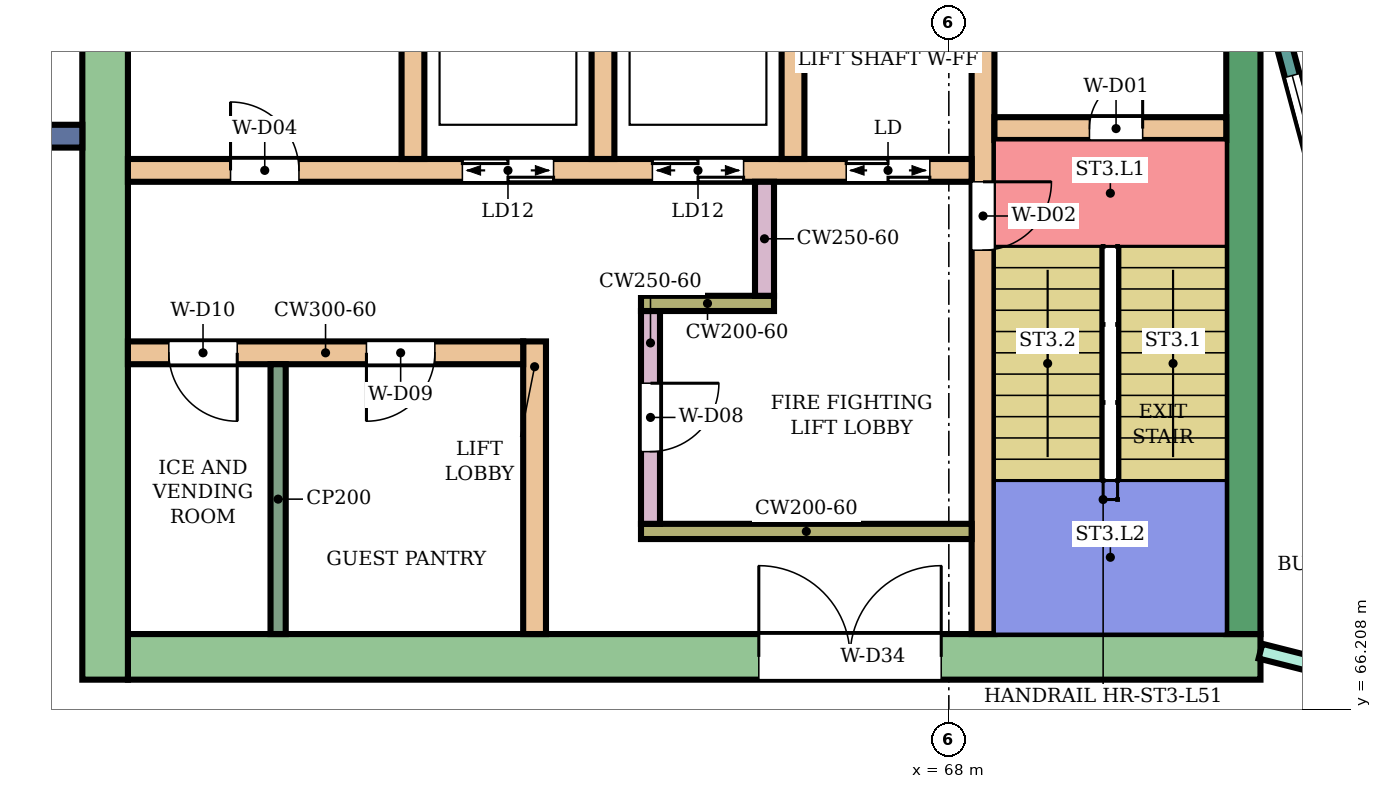
"""IFC4 building model, lengths in metres.
Left out: names, types, materials, properties, quantities, classifications, styles, units other than length and angle.
Written with IfcOpenShell. Run it as: python <this file> out.ifc"""

import sys

from ifc_helpers import new_model, si_unit, direction, frame, frame_2d, origin, place, context, subcontext, project, spatial, rectangle, extrude, element, fill, save


model = new_model("IFC4")
c1 = context("Model", 3, precision=1e-05, world=origin(), true_north=direction((0.0, 1.0)))
c2 = subcontext(c1, "Body", "Model", "MODEL_VIEW")
j1 = project(units=[si_unit("LENGTHUNIT", "METRE"), si_unit("PLANEANGLEUNIT", "RADIAN")], contexts=[c1])
p1 = place(None, origin())
s1 = spatial("IfcSite", under=j1, at=p1, CompositionType="ELEMENT")
p2 = place(p1, origin())
s2 = spatial("IfcBuilding", under=s1, at=p2, CompositionType="ELEMENT")
p3 = place(p2, frame((0.0, 0.0, 220.9)))
s3 = spatial("IfcBuildingStorey", under=s2, at=p3, CompositionType="ELEMENT", Elevation=220.9)
p4 = place(p3, frame((72.1, 66.9, 0.0), z_axis=(0.0, 0.0, 1.0), x_axis=(-1.0, 0.0, 0.0)))
e1 = element("IfcWall", 1, at=p4, inside=s3, PredefinedType="SHEAR", context=c2, shape_type="SweptSolid", body=[
    extrude(rectangle(XDim=14.9, YDim=0.6, at=frame_2d((7.45, 0.0))), origin(), (0.0, 0.0, 1.0), 3.88),
])
p5 = place(p4, frame((4.2, 0.0, 0.0)))
e2 = element("IfcOpeningElement", 2, at=p5, cuts=e1, PredefinedType="OPENING", context=c2, shape_type="SweptSolid", body=[
    extrude(rectangle(XDim=2.4, YDim=2.4, at=frame_2d((1.2, 1.2))), frame((0.0, 0.31, 0.0), z_axis=(0.0, -1.0, 0.0), x_axis=(1.0, 0.0, 0.0)), (0.0, 0.0, 1.0), 0.62),
])
p6 = place(p3, frame((71.875, 75.0, 0.0), z_axis=(0.0, 0.0, 1.0), x_axis=(0.0, -1.0, 0.0)))
e3 = element("IfcWall", 3, at=p6, inside=s3, PredefinedType="SHEAR", context=c2, shape_type="SweptSolid", body=[
    extrude(rectangle(XDim=7.8, YDim=0.45, at=frame_2d((3.9, 0.0))), origin(), (0.0, 0.0, 1.0), 3.88),
])
p7 = place(p3, frame((56.9, 83.4, 0.0), z_axis=(0.0, 0.0, 1.0), x_axis=(0.0, -1.0, 0.0)))
e4 = element("IfcWall", 4, at=p7, inside=s3, PredefinedType="SHEAR", context=c2, shape_type="SweptSolid", body=[
    extrude(rectangle(XDim=16.8, YDim=0.6, at=frame_2d((8.4, 0.0))), origin(), (0.0, 0.0, 1.0), 3.88),
])
p8 = place(p3, frame((68.45, 75.0, 0.0), z_axis=(0.0, 0.0, 1.0), x_axis=(0.0, -1.0, 0.0)))
e5 = element("IfcWall", 5, at=p8, inside=s3, PredefinedType="SHEAR", context=c2, shape_type="SweptSolid", body=[
    extrude(rectangle(XDim=7.8, YDim=0.3, at=frame_2d((3.9, 0.0))), origin(), (0.0, 0.0, 1.0), 3.88),
])
p9 = place(p8, frame((1.85, 0.0, 0.0)))
e6 = element("IfcOpeningElement", 6, at=p9, cuts=e5, PredefinedType="OPENING", context=c2, shape_type="SweptSolid", body=[
    extrude(rectangle(XDim=0.9, YDim=2.1, at=frame_2d((0.45, 1.05))), frame((0.0, 0.16, 0.0), z_axis=(0.0, -1.0, 0.0), x_axis=(1.0, 0.0, 0.0)), (0.0, 0.0, 1.0), 0.32),
])
p10 = place(p3, frame((71.65, 73.85, 0.0), z_axis=(0.0, 0.0, 1.0), x_axis=(-1.0, 0.0, 0.0)))
e7 = element("IfcWall", 7, at=p10, inside=s3, PredefinedType="SHEAR", context=c2, shape_type="SweptSolid", body=[
    extrude(rectangle(XDim=3.05, YDim=0.3, at=frame_2d((1.525, 0.0))), origin(), (0.0, 0.0, 1.0), 3.88),
])
p11 = place(p10, frame((1.1, 0.0, 0.0)))
e8 = element("IfcOpeningElement", 8, at=p11, cuts=e7, PredefinedType="OPENING", context=c2, shape_type="SweptSolid", body=[
    extrude(rectangle(XDim=0.7, YDim=2.0, at=frame_2d((0.35, 1.0))), frame((0.0, 0.16, 0.0), z_axis=(0.0, -1.0, 0.0), x_axis=(1.0, 0.0, 0.0)), (0.0, 0.0, 1.0), 0.32),
])
p12 = place(p3, frame((68.3, 73.3, 0.0), z_axis=(0.0, 0.0, 1.0), x_axis=(-1.0, 0.0, 0.0)))
e9 = element("IfcWall", 9, at=p12, inside=s3, PredefinedType="SHEAR", context=c2, shape_type="SweptSolid", body=[
    extrude(rectangle(XDim=11.1, YDim=0.3, at=frame_2d((5.55, 0.0))), origin(), (0.0, 0.0, 1.0), 3.88),
])
p13 = place(p12, frame((0.55, 0.0, 0.0)))
e10 = element("IfcOpeningElement", 10, at=p13, cuts=e9, PredefinedType="OPENING", context=c2, shape_type="SweptSolid", body=[
    extrude(rectangle(XDim=1.1, YDim=2.1, at=frame_2d((0.55, 1.05))), frame((0.0, 0.16, 0.0), z_axis=(0.0, -1.0, 0.0), x_axis=(1.0, 0.0, 0.0)), (0.0, 0.0, 1.0), 0.32),
])
p14 = place(p12, frame((3.0, 0.0, 0.0)))
e11 = element("IfcOpeningElement", 11, at=p14, cuts=e9, PredefinedType="OPENING", context=c2, shape_type="SweptSolid", body=[
    extrude(rectangle(XDim=1.2, YDim=2.1, at=frame_2d((0.6, 1.05))), frame((0.0, 0.16, 0.0), z_axis=(0.0, -1.0, 0.0), x_axis=(1.0, 0.0, 0.0)), (0.0, 0.0, 1.0), 0.32),
])
p15 = place(p12, frame((5.5, 0.0, 0.0)))
e12 = element("IfcOpeningElement", 12, at=p15, cuts=e9, PredefinedType="OPENING", context=c2, shape_type="SweptSolid", body=[
    extrude(rectangle(XDim=1.2, YDim=2.1, at=frame_2d((0.6, 1.05))), frame((0.0, 0.16, 0.0), z_axis=(0.0, -1.0, 0.0), x_axis=(1.0, 0.0, 0.0)), (0.0, 0.0, 1.0), 0.32),
])
p16 = place(p12, frame((8.85, 0.0, 0.0)))
e13 = element("IfcOpeningElement", 13, at=p16, cuts=e9, PredefinedType="OPENING", context=c2, shape_type="SweptSolid", body=[
    extrude(rectangle(XDim=0.9, YDim=2.1, at=frame_2d((0.45, 1.05))), frame((0.0, 0.16, 0.0), z_axis=(0.0, -1.0, 0.0), x_axis=(1.0, 0.0, 0.0)), (0.0, 0.0, 1.0), 0.32),
])
for number, where, z_axis, x_axis in (
    (14, (65.95, 76.0, 0.0), (0.0, 0.0, 1.0), (0.0, -1.0, 0.0)),
    (15, (63.45, 76.0, 0.0), (0.0, 0.0, 1.0), (0.0, -1.0, 0.0)),
    (16, (60.95, 76.0, 0.0), (0.0, 0.0, 1.0), (0.0, -1.0, 0.0)),
):
    element("IfcWall", number, at=place(p3, frame(where, z_axis=z_axis, x_axis=x_axis)), inside=s3, PredefinedType="SHEAR", context=c2, shape_type="SweptSolid", body=[
        extrude(rectangle(XDim=2.55, YDim=0.3, at=frame_2d((1.275, 0.0))), origin(), (0.0, 0.0, 1.0), 3.88),
    ])
p17 = place(p3, frame((68.3, 68.55, 0.0), z_axis=(0.0, 0.0, 1.0), x_axis=(-1.0, 0.0, 0.0)))
e17 = element("IfcWall", 17, at=p17, inside=s3, PredefinedType="SHEAR", context=c2, shape_type="SweptSolid", body=[
    extrude(rectangle(XDim=4.35, YDim=0.2, at=frame_2d((2.175, 0.0))), origin(), (0.0, 0.0, 1.0), 3.88),
])
p18 = place(p3, frame((64.075, 71.45, 0.0), z_axis=(0.0, 0.0, 1.0), x_axis=(0.0, -1.0, 0.0)))
e18 = element("IfcWall", 18, at=p18, inside=s3, PredefinedType="SHEAR", context=c2, shape_type="SweptSolid", body=[
    extrude(rectangle(XDim=2.8, YDim=0.25, at=frame_2d((1.4, 0.0))), origin(), (0.0, 0.0, 1.0), 3.88),
])
p19 = place(p18, frame((0.95, 0.0, 0.0)))
e19 = element("IfcOpeningElement", 19, at=p19, cuts=e18, PredefinedType="OPENING", context=c2, shape_type="SweptSolid", body=[
    extrude(rectangle(XDim=0.9, YDim=2.1, at=frame_2d((0.45, 1.05))), frame((0.0, 0.135, 0.0), z_axis=(0.0, -1.0, 0.0), x_axis=(1.0, 0.0, 0.0)), (0.0, 0.0, 1.0), 0.27),
])
p20 = place(p3, frame((65.7, 71.55, 0.0), z_axis=(0.0, 0.0, 1.0), x_axis=(-1.0, 0.0, 0.0)))
e20 = element("IfcWall", 20, at=p20, inside=s3, PredefinedType="SHEAR", context=c2, shape_type="SweptSolid", body=[
    extrude(rectangle(XDim=1.75, YDim=0.2, at=frame_2d((0.875, 0.0))), origin(), (0.0, 0.0, 1.0), 3.88),
])
p21 = place(p3, frame((65.575, 73.15, 0.0), z_axis=(0.0, 0.0, 1.0), x_axis=(0.0, -1.0, 0.0)))
e21 = element("IfcWall", 21, at=p21, inside=s3, PredefinedType="SHEAR", context=c2, shape_type="SweptSolid", body=[
    extrude(rectangle(XDim=1.5, YDim=0.25, at=frame_2d((0.75, 0.0))), origin(), (0.0, 0.0, 1.0), 3.88),
])
p22 = place(p3, frame((62.55, 71.05, 0.0), z_axis=(0.0, 0.0, 1.0), x_axis=(0.0, -1.0, 0.0)))
e22 = element("IfcWall", 22, at=p22, inside=s3, PredefinedType="SHEAR", context=c2, shape_type="SweptSolid", body=[
    extrude(rectangle(XDim=3.85, YDim=0.3, at=frame_2d((1.925, 0.0))), origin(), (0.0, 0.0, 1.0), 3.88),
])
p23 = place(p3, frame((62.4, 70.9, 0.0), z_axis=(0.0, 0.0, 1.0), x_axis=(-1.0, 0.0, 0.0)))
e23 = element("IfcWall", 23, at=p23, inside=s3, PredefinedType="SHEAR", context=c2, shape_type="SweptSolid", body=[
    extrude(rectangle(XDim=5.2, YDim=0.3, at=frame_2d((2.6, 0.0))), origin(), (0.0, 0.0, 1.0), 3.88),
])
p24 = place(p23, frame((1.162, 0.0, 0.0)))
e24 = element("IfcOpeningElement", 24, at=p24, cuts=e23, PredefinedType="OPENING", context=c2, shape_type="SweptSolid", body=[
    extrude(rectangle(XDim=0.9, YDim=2.1, at=frame_2d((0.45, 1.05))), frame((0.0, 0.16, 0.0), z_axis=(0.0, -1.0, 0.0), x_axis=(1.0, 0.0, 0.0)), (0.0, 0.0, 1.0), 0.32),
])
p25 = place(p23, frame((3.762, 0.0, 0.0)))
e25 = element("IfcOpeningElement", 25, at=p25, cuts=e23, PredefinedType="OPENING", context=c2, shape_type="SweptSolid", body=[
    extrude(rectangle(XDim=0.9, YDim=2.1, at=frame_2d((0.45, 1.05))), frame((0.0, 0.16, 0.0), z_axis=(0.0, -1.0, 0.0), x_axis=(1.0, 0.0, 0.0)), (0.0, 0.0, 1.0), 0.32),
])
p26 = place(p3, frame((56.6, 73.75, 0.0), z_axis=(0.0, 0.0, 1.0), x_axis=(-1.0, 0.0, 0.0)))
e26 = element("IfcWall", 26, at=p26, inside=s3, PredefinedType="NOTDEFINED", context=c2, shape_type="SweptSolid", body=[
    extrude(rectangle(XDim=2.416, YDim=0.3, at=frame_2d((1.208, 0.0))), origin(), (0.0, 0.0, 1.0), 4.2),
])
p27 = place(p3, frame((72.396, 75.0, 0.0), z_axis=(0.0, 0.0, 1.0), x_axis=(0.258789828301, -0.965933654434, 0.0)))
e27 = element("IfcWall", 27, at=p27, inside=s3, PredefinedType="NOTDEFINED", context=c2, shape_type="SweptSolid", body=[
    extrude(rectangle(XDim=3.936, YDim=0.2, at=frame_2d((1.968, 0.0))), origin(), (0.0, 0.0, 1.0), 4.2),
])
p28 = place(p27, frame((0.468, 0.0, 0.9)))
e28 = element("IfcOpeningElement", 28, at=p28, cuts=e27, PredefinedType="OPENING", context=c2, shape_type="SweptSolid", body=[
    extrude(rectangle(XDim=3.0, YDim=2.3, at=frame_2d((1.5, 1.15))), frame((0.0, 0.11, 0.0), z_axis=(0.0, -1.0, 0.0), x_axis=(1.0, 0.0, 0.0)), (0.0, 0.0, 1.0), 0.22),
])
p29 = place(p3, frame((72.1, 66.975, 0.0), z_axis=(0.0, 0.0, 1.0), x_axis=(0.969471314457, -0.245204752086, 0.0)))
e29 = element("IfcWall", 29, at=p29, inside=s3, PredefinedType="PARTITIONING", context=c2, shape_type="SweptSolid", body=[
    extrude(rectangle(XDim=2.582, YDim=0.2, at=frame_2d((1.291, 0.0))), origin(), (0.0, 0.0, 1.0), 3.75),
])
p30 = place(p29, frame((0.841, 0.0, 0.0)))
e30 = element("IfcOpeningElement", 30, at=p30, cuts=e29, PredefinedType="OPENING", context=c2, shape_type="SweptSolid", body=[
    extrude(rectangle(XDim=0.9, YDim=2.1, at=frame_2d((0.45, 1.05))), frame((0.0, 0.11, 0.0), z_axis=(0.0, -1.0, 0.0), x_axis=(1.0, 0.0, 0.0)), (0.0, 0.0, 1.0), 0.22),
])
p31 = place(p3, frame((59.176, 70.75, 0.0), z_axis=(0.0, 0.0, 1.0), x_axis=(0.0, -1.0, 0.0)))
e31 = element("IfcWall", 31, at=p31, inside=s3, PredefinedType="PARTITIONING", context=c2, shape_type="SweptSolid", body=[
    extrude(rectangle(XDim=3.55, YDim=0.2, at=frame_2d((1.775, 0.0))), origin(), (0.0, 0.0, 1.0), 3.88),
])
p32 = place(p28, origin())
e32 = element("IfcWindow", 32, at=p32, inside=s3, PartitioningType="SINGLE_PANEL", PredefinedType="WINDOW", context=c2, shape_type="SweptSolid", body=[
    extrude(rectangle(XDim=3.0, YDim=2.3, at=frame_2d((1.5, 1.15))), frame((0.0, 0.03, 0.0), z_axis=(0.0, -1.0, 0.0), x_axis=(1.0, 0.0, 0.0)), (0.0, 0.0, 1.0), 0.06),
])
fill(e28, e32)
p33 = place(p11, frame((0.7, 0.0, 0.0), z_axis=(0.0, 0.0, 1.0), x_axis=(-1.0, 0.0, 0.0)))
e33 = element("IfcDoor", 33, at=p33, inside=s3, OperationType="SINGLE_SWING_RIGHT", PredefinedType="DOOR", context=c2, shape_type="SweptSolid", body=[
    extrude(rectangle(XDim=0.7, YDim=2.0, at=frame_2d((0.35, 1.0))), frame((0.0, 0.025, 0.0), z_axis=(0.0, -1.0, 0.0), x_axis=(1.0, 0.0, 0.0)), (0.0, 0.0, 1.0), 0.05),
])
fill(e8, e33)
p34 = place(p9, origin())
e34 = element("IfcDoor", 34, at=p34, inside=s3, OperationType="SINGLE_SWING_LEFT", PredefinedType="DOOR", context=c2, shape_type="SweptSolid", body=[
    extrude(rectangle(XDim=0.9, YDim=2.1, at=frame_2d((0.45, 1.05))), frame((0.0, 0.025, 0.0), z_axis=(0.0, -1.0, 0.0), x_axis=(1.0, 0.0, 0.0)), (0.0, 0.0, 1.0), 0.05),
])
fill(e6, e34)
p35 = place(p13, origin())
e35 = element("IfcDoor", 35, at=p35, inside=s3, OperationType="DOUBLE_DOOR_SLIDING", PredefinedType="DOOR", context=c2, shape_type="SweptSolid", body=[
    extrude(rectangle(XDim=1.1, YDim=2.1, at=frame_2d((0.55, 1.05))), frame((0.0, 0.025, 0.0), z_axis=(0.0, -1.0, 0.0), x_axis=(1.0, 0.0, 0.0)), (0.0, 0.0, 1.0), 0.05),
])
fill(e10, e35)
p36 = place(p14, origin())
e36 = element("IfcDoor", 36, at=p36, inside=s3, OperationType="DOUBLE_DOOR_SLIDING", PredefinedType="DOOR", context=c2, shape_type="SweptSolid", body=[
    extrude(rectangle(XDim=1.2, YDim=2.1, at=frame_2d((0.6, 1.05))), frame((0.0, 0.025, 0.0), z_axis=(0.0, -1.0, 0.0), x_axis=(1.0, 0.0, 0.0)), (0.0, 0.0, 1.0), 0.05),
])
fill(e11, e36)
p37 = place(p15, origin())
e37 = element("IfcDoor", 37, at=p37, inside=s3, OperationType="DOUBLE_DOOR_SLIDING", PredefinedType="DOOR", context=c2, shape_type="SweptSolid", body=[
    extrude(rectangle(XDim=1.2, YDim=2.1, at=frame_2d((0.6, 1.05))), frame((0.0, 0.025, 0.0), z_axis=(0.0, -1.0, 0.0), x_axis=(1.0, 0.0, 0.0)), (0.0, 0.0, 1.0), 0.05),
])
fill(e12, e37)
p38 = place(p16, frame((0.9, 0.0, 0.0), z_axis=(0.0, 0.0, 1.0), x_axis=(-1.0, 0.0, 0.0)))
e38 = element("IfcDoor", 38, at=p38, inside=s3, OperationType="SINGLE_SWING_LEFT", PredefinedType="DOOR", context=c2, shape_type="SweptSolid", body=[
    extrude(rectangle(XDim=0.9, YDim=2.1, at=frame_2d((0.45, 1.05))), frame((0.0, 0.025, 0.0), z_axis=(0.0, -1.0, 0.0), x_axis=(1.0, 0.0, 0.0)), (0.0, 0.0, 1.0), 0.05),
])
fill(e13, e38)
p39 = place(p19, origin())
e39 = element("IfcDoor", 39, at=p39, inside=s3, OperationType="SINGLE_SWING_LEFT", PredefinedType="DOOR", context=c2, shape_type="SweptSolid", body=[
    extrude(rectangle(XDim=0.9, YDim=2.1, at=frame_2d((0.45, 1.05))), frame((0.0, 0.025, 0.0), z_axis=(0.0, -1.0, 0.0), x_axis=(1.0, 0.0, 0.0)), (0.0, 0.0, 1.0), 0.05),
])
fill(e19, e39)
p40 = place(p24, origin())
e40 = element("IfcDoor", 40, at=p40, inside=s3, OperationType="SINGLE_SWING_RIGHT", PredefinedType="DOOR", context=c2, shape_type="SweptSolid", body=[
    extrude(rectangle(XDim=0.9, YDim=2.1, at=frame_2d((0.45, 1.05))), frame((0.0, 0.025, 0.0), z_axis=(0.0, -1.0, 0.0), x_axis=(1.0, 0.0, 0.0)), (0.0, 0.0, 1.0), 0.05),
])
fill(e24, e40)
p41 = place(p25, origin())
e41 = element("IfcDoor", 41, at=p41, inside=s3, OperationType="SINGLE_SWING_LEFT", PredefinedType="DOOR", context=c2, shape_type="SweptSolid", body=[
    extrude(rectangle(XDim=0.9, YDim=2.1, at=frame_2d((0.45, 1.05))), frame((0.0, 0.025, 0.0), z_axis=(0.0, -1.0, 0.0), x_axis=(1.0, 0.0, 0.0)), (0.0, 0.0, 1.0), 0.05),
])
fill(e25, e41)
p42 = place(p5, frame((2.4, 0.0, 0.0), z_axis=(0.0, 0.0, 1.0), x_axis=(-1.0, 0.0, 0.0)))
e42 = element("IfcDoor", 42, at=p42, inside=s3, OperationType="DOUBLE_DOOR_SINGLE_SWING", PredefinedType="DOOR", context=c2, shape_type="SweptSolid", body=[
    extrude(rectangle(XDim=2.4, YDim=2.4, at=frame_2d((1.2, 1.2))), frame((0.0, 0.025, 0.0), z_axis=(0.0, -1.0, 0.0), x_axis=(1.0, 0.0, 0.0)), (0.0, 0.0, 1.0), 0.05),
])
fill(e2, e42)
save(model, sys.argv[1])
